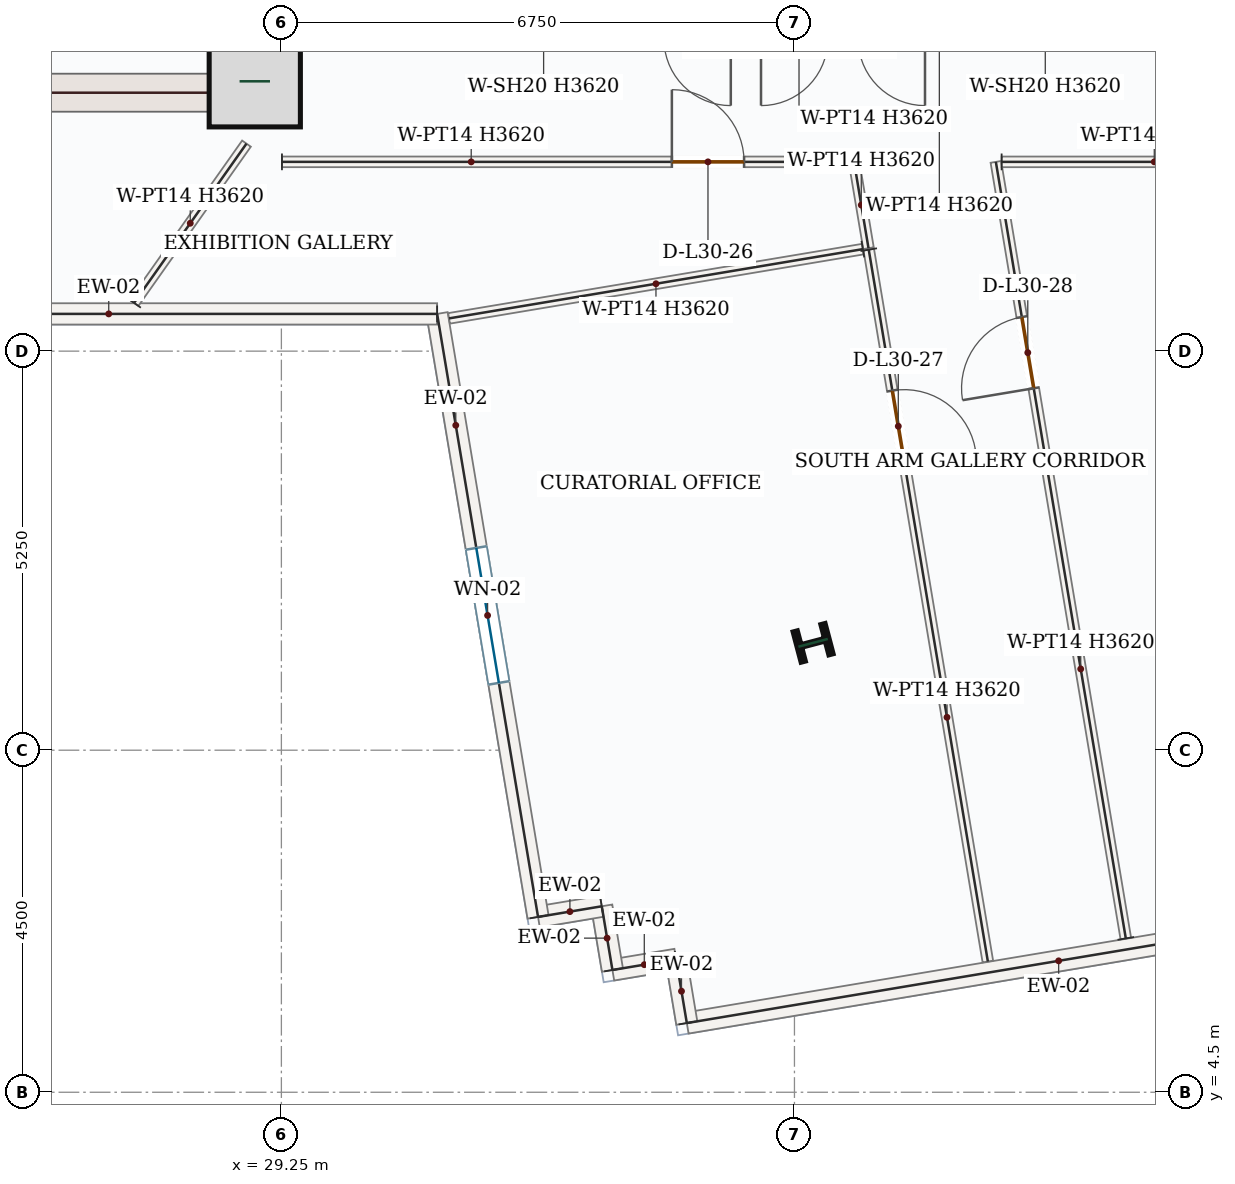
"""IFC4 building model, lengths in metres.
Left out: names, types, materials, properties, quantities, classifications, styles, units other than length and angle.
Written with IfcOpenShell. Run it as: python <this file> out.ifc"""

import sys

from ifc_helpers import new_model, si_unit, direction, frame, frame_2d, origin, origin_2d, place, context, subcontext, project, spatial, rectangle, i_section, extrude, source, transform, mapped, element, fill, save


model = new_model("IFC4")
c1 = context("Model", 3, precision=1e-05, world=origin(), true_north=direction((0.0, 1.0)))
c2 = subcontext(c1, "Body", "Model", "MODEL_VIEW")
j1 = project(units=[si_unit("LENGTHUNIT", "METRE"), si_unit("PLANEANGLEUNIT", "RADIAN")], contexts=[c1])
p1 = place(None, origin())
s1 = spatial("IfcSite", under=j1, at=p1, CompositionType="ELEMENT")
p2 = place(p1, origin())
s2 = spatial("IfcBuilding", under=s1, at=p2, CompositionType="ELEMENT")
p3 = place(p2, frame((0.0, 0.0, 135.6)))
s3 = spatial("IfcBuildingStorey", under=s2, at=p3, CompositionType="ELEMENT", Elevation=135.6)
p4 = place(p3, frame((29.0, 17.4, 0.0), z_axis=(0.0, 0.0, 1.0), x_axis=(0.0, 1.0, 0.0)))
e1 = element("IfcWall", 1, at=p4, inside=s3, PredefinedType="SHEAR", context=c2, shape_type="SweptSolid", body=[
    extrude(rectangle(XDim=8.55, YDim=0.5, at=frame_2d((4.275, 0.0))), origin(), (0.0, 0.0, 1.0), 3.62),
])
p5 = place(p4, frame((6.65, 0.0, 0.0)))
e2 = element("IfcOpeningElement", 2, at=p5, cuts=e1, PredefinedType="OPENING", context=c2, shape_type="SweptSolid", body=[
    extrude(rectangle(XDim=1.1, YDim=2.2, at=frame_2d((0.55, 1.1))), frame((0.0, 0.26, 0.0), z_axis=(0.0, -1.0, 0.0), x_axis=(1.0, 0.0, 0.0)), (0.0, 0.0, 1.0), 0.52),
])
p6 = place(p4, frame((2.7, 0.0, 0.0)))
e3 = element("IfcOpeningElement", 3, at=p6, cuts=e1, PredefinedType="OPENING", context=c2, shape_type="SweptSolid", body=[
    extrude(rectangle(XDim=0.88, YDim=2.1, at=frame_2d((0.44, 1.05))), frame((0.0, 0.26, 0.0), z_axis=(0.0, -1.0, 0.0), x_axis=(1.0, 0.0, 0.0)), (0.0, 0.0, 1.0), 0.52),
])
p7 = place(p4, frame((4.6, 0.0, 0.0)))
e4 = element("IfcOpeningElement", 4, at=p7, cuts=e1, PredefinedType="OPENING", context=c2, shape_type="SweptSolid", body=[
    extrude(rectangle(XDim=0.88, YDim=2.1, at=frame_2d((0.44, 1.05))), frame((0.0, 0.26, 0.0), z_axis=(0.0, -1.0, 0.0), x_axis=(1.0, 0.0, 0.0)), (0.0, 0.0, 1.0), 0.52),
])
m1 = source(origin(), c2, "Body", "SweptSolid", [
    extrude(rectangle(XDim=7.0, YDim=0.5, at=frame_2d((3.5, 0.0))), origin(), (0.0, 0.0, 1.0), 3.62),
])
p8 = place(p3, frame((21.75, 17.65, 0.0), z_axis=(0.0, 0.0, 1.0), x_axis=(1.0, 0.0, 0.0)))
e5 = element("IfcWall", 5, at=p8, inside=s3, PredefinedType="SHEAR", context=c2, shape_type="MappedRepresentation", body=[
    mapped(m1, transform((0.0, 0.0, 0.0), x_axis=(1.0, 0.0, 0.0), y_axis=(0.0, 1.0, 0.0), z_axis=(0.0, 0.0, 1.0), scale=1.0)),
])
m2 = source(origin(), c2, "Body", "SweptSolid", [
    extrude(rectangle(XDim=1.2, YDim=1.2, at=origin_2d()), origin(), (0.0, 0.0, 1.0), 3.9),
])
p9 = place(p3, frame((28.9, 17.8, 0.0), z_axis=(0.0, 0.0, 1.0), x_axis=(1.0, 0.0, 0.0)))
e6 = element("IfcColumn", 6, at=p9, inside=s3, PredefinedType="COLUMN", context=c2, shape_type="MappedRepresentation", body=[
    mapped(m2, transform((0.0, 0.0, 0.0), x_axis=(1.0, 0.0, 0.0), y_axis=(0.0, 1.0, 0.0), z_axis=(0.0, 0.0, 1.0), scale=1.0)),
])
m3 = source(origin(), c2, "Body", "SweptSolid", [
    extrude(i_section(OverallWidth=0.412, OverallDepth=0.435, WebThickness=0.036, FlangeThickness=0.057, FilletRadius=0.018, at=origin_2d()), origin(), (0.0, 0.0, 1.0), 3.9),
])
p10 = place(p3, frame((36.245, 10.412, 0.0), z_axis=(0.0, 0.0, 1.0), x_axis=(-0.255445757936, 0.966823388604, 0.0)))
e7 = element("IfcColumn", 7, at=p10, inside=s3, PredefinedType="COLUMN", context=c2, shape_type="MappedRepresentation", body=[
    mapped(m3, transform((0.0, 0.0, 0.0), x_axis=(1.0, 0.0, 0.0), y_axis=(0.0, 1.0, 0.0), z_axis=(0.0, 0.0, 1.0), scale=1.0)),
])
m4 = source(origin(), c2, "Body", "SweptSolid", [
    extrude(rectangle(XDim=9.92, YDim=0.28, at=frame_2d((4.96, 0.0))), origin(), (0.0, 0.0, 1.0), 3.62),
])
p11 = place(p3, frame((44.368, 7.048, 0.0), z_axis=(0.0, 0.0, 1.0), x_axis=(-0.986282616944, -0.165065440096, 0.0)))
e8 = element("IfcWall", 8, at=p11, inside=s3, PredefinedType="SOLIDWALL", context=c2, shape_type="MappedRepresentation", body=[
    mapped(m4, transform((0.0, 0.0, 0.0), x_axis=(1.0, 0.0, 0.0), y_axis=(0.0, 1.0, 0.0), z_axis=(0.0, 0.0, 1.0), scale=1.0)),
])
m5 = source(origin(), c2, "Body", "SweptSolid", [
    extrude(rectangle(XDim=0.85, YDim=0.28, at=frame_2d((0.425, 0.0))), origin(), (0.0, 0.0, 1.0), 3.62),
])
for number, where, z_axis, x_axis in (
    (9, (34.584, 5.41, 0.0), (0.0, 0.0, 1.0), (-0.165, 0.986, 0.0)),
    (10, (34.444, 6.249, 0.0), (0.0, 0.0, 1.0), (-0.986, -0.165, 0.0)),
):
    element("IfcWall", number, at=place(p3, frame(where, z_axis=z_axis, x_axis=x_axis)), inside=s3, PredefinedType="SOLIDWALL", context=c2, shape_type="MappedRepresentation", body=[
        mapped(m5, transform((0.0, 0.0, 0.0), x_axis=(1.0, 0.0, 0.0), y_axis=(0.0, 1.0, 0.0), z_axis=(0.0, 0.0, 1.0), scale=1.0)),
    ])
m6 = source(origin(), c2, "Body", "SweptSolid", [
    extrude(rectangle(XDim=0.85, YDim=0.28, at=frame_2d((0.425, 0.0))), origin(), (0.0, 0.0, 1.0), 3.62),
])
p12 = place(p3, frame((33.605, 6.108, 0.0), z_axis=(0.0, 0.0, 1.0), x_axis=(-0.164911450083, 0.986308376539, 0.0)))
e11 = element("IfcWall", 11, at=p12, inside=s3, PredefinedType="SOLIDWALL", context=c2, shape_type="MappedRepresentation", body=[
    mapped(m6, transform((0.0, 0.0, 0.0), x_axis=(1.0, 0.0, 0.0), y_axis=(0.0, 1.0, 0.0), z_axis=(0.0, 0.0, 1.0), scale=1.0)),
])
p13 = place(p3, frame((33.465, 6.947, 0.0), z_axis=(0.0, 0.0, 1.0), x_axis=(-0.986316186628, -0.164864732418, 0.0)))
e12 = element("IfcWall", 12, at=p13, inside=s3, PredefinedType="SOLIDWALL", context=c2, shape_type="MappedRepresentation", body=[
    mapped(m5, transform((0.0, 0.0, 0.0), x_axis=(1.0, 0.0, 0.0), y_axis=(0.0, 1.0, 0.0), z_axis=(0.0, 0.0, 1.0), scale=1.0)),
])
p14 = place(p3, frame((32.627, 6.806, 0.0), z_axis=(0.0, 0.0, 1.0), x_axis=(-0.165048626668, 0.986285430712, 0.0)))
e13 = element("IfcWall", 13, at=p14, inside=s3, PredefinedType="SOLIDWALL", context=c2, shape_type="SweptSolid", body=[
    extrude(rectangle(XDim=8.044, YDim=0.28, at=frame_2d((4.022, 0.0))), origin(), (0.0, 0.0, 1.0), 3.62),
])
p15 = place(p14, frame((3.122, 0.0, 0.85)))
e14 = element("IfcOpeningElement", 14, at=p15, cuts=e13, PredefinedType="OPENING", context=c2, shape_type="SweptSolid", body=[
    extrude(rectangle(XDim=1.8, YDim=1.75, at=frame_2d((0.9, 0.875))), frame((0.0, 0.15, 0.0), z_axis=(0.0, -1.0, 0.0), x_axis=(1.0, 0.0, 0.0)), (0.0, 0.0, 1.0), 0.3),
])
m7 = source(origin(), c2, "Body", "SweptSolid", [
    extrude(rectangle(XDim=8.641, YDim=0.28, at=frame_2d((4.321, 0.0))), origin(), (0.0, 0.0, 1.0), 3.62),
])
p16 = place(p3, frame((31.299, 14.74, 0.0), z_axis=(0.0, 0.0, 1.0), x_axis=(-1.0, 0.0, 0.0)))
e15 = element("IfcWall", 15, at=p16, inside=s3, PredefinedType="SOLIDWALL", context=c2, shape_type="MappedRepresentation", body=[
    mapped(m7, transform((0.0, 0.0, 0.0), x_axis=(1.0, 0.0, 0.0), y_axis=(0.0, 1.0, 0.0), z_axis=(0.0, 0.0, 1.0), scale=1.0)),
])
p17 = place(p3, frame((29.258, 16.74, 0.0), z_axis=(0.0, 0.0, 1.0), x_axis=(0.999999999474, -3.2436991e-05, 0.0)))
e16 = element("IfcWall", 16, at=p17, inside=s3, PredefinedType="PARTITIONING", context=c2, shape_type="SweptSolid", body=[
    extrude(rectangle(XDim=7.527, YDim=0.14, at=frame_2d((3.763, 0.0))), origin(), (0.0, 0.0, 1.0), 3.62),
])
p18 = place(p17, frame((5.13, 0.0, 0.0)))
e17 = element("IfcOpeningElement", 17, at=p18, cuts=e16, PredefinedType="OPENING", context=c2, shape_type="SweptSolid", body=[
    extrude(rectangle(XDim=0.95, YDim=2.15, at=frame_2d((0.475, 1.075))), frame((0.0, 0.08, 0.0), z_axis=(0.0, -1.0, 0.0), x_axis=(1.0, 0.0, 0.0)), (0.0, 0.0, 1.0), 0.16),
])
m8 = source(origin(), c2, "Body", "SweptSolid", [
    extrude(rectangle(XDim=1.151, YDim=0.14, at=frame_2d((0.576, 0.0))), origin(), (0.0, 0.0, 1.0), 3.62),
])
p19 = place(p3, frame((36.784, 16.74, 0.0), z_axis=(0.0, 0.0, 1.0), x_axis=(0.164983559387, -0.986296317104, 0.0)))
e18 = element("IfcWall", 18, at=p19, inside=s3, PredefinedType="PARTITIONING", context=c2, shape_type="MappedRepresentation", body=[
    mapped(m8, transform((0.0, 0.0, 0.0), x_axis=(1.0, 0.0, 0.0), y_axis=(0.0, 1.0, 0.0), z_axis=(0.0, 0.0, 1.0), scale=1.0)),
])
m9 = source(origin(), c2, "Body", "SweptSolid", [
    extrude(rectangle(XDim=5.52, YDim=0.14, at=frame_2d((2.76, 0.0))), origin(), (0.0, 0.0, 1.0), 3.62),
])
p20 = place(p3, frame((36.9, 15.592, 0.0), z_axis=(0.0, 0.0, 1.0), x_axis=(-0.986290930087, -0.165015760545, 0.0)))
e19 = element("IfcWall", 19, at=p20, inside=s3, PredefinedType="PARTITIONING", context=c2, shape_type="MappedRepresentation", body=[
    mapped(m9, transform((0.0, 0.0, 0.0), x_axis=(1.0, 0.0, 0.0), y_axis=(0.0, 1.0, 0.0), z_axis=(0.0, 0.0, 1.0), scale=1.0)),
])
m10 = source(origin(), c2, "Body", "SweptSolid", [
    extrude(rectangle(XDim=2.565, YDim=0.14, at=frame_2d((1.282, 0.0))), origin(), (0.0, 0.0, 1.0), 3.62),
])
p21 = place(p3, frame((27.311, 14.885, 0.0), z_axis=(0.0, 0.0, 1.0), x_axis=(0.576926084836, 0.816796359343, 0.0)))
e20 = element("IfcWall", 20, at=p21, inside=s3, PredefinedType="PARTITIONING", context=c2, shape_type="MappedRepresentation", body=[
    mapped(m10, transform((0.0, 0.0, 0.0), x_axis=(1.0, 0.0, 0.0), y_axis=(0.0, 1.0, 0.0), z_axis=(0.0, 0.0, 1.0), scale=1.0)),
])
p22 = place(p3, frame((36.978, 15.585, 0.0), z_axis=(0.0, 0.0, 1.0), x_axis=(0.165024399413, -0.986289484684, 0.0)))
e21 = element("IfcWall", 21, at=p22, inside=s3, PredefinedType="PARTITIONING", context=c2, shape_type="SweptSolid", body=[
    extrude(rectangle(XDim=9.495, YDim=0.14, at=frame_2d((4.748, 0.0))), origin(), (0.0, 0.0, 1.0), 3.62),
])
p23 = place(p22, frame((1.88, 0.0, 0.0)))
e22 = element("IfcOpeningElement", 22, at=p23, cuts=e21, PredefinedType="OPENING", context=c2, shape_type="SweptSolid", body=[
    extrude(rectangle(XDim=0.95, YDim=2.15, at=frame_2d((0.475, 1.075))), frame((0.0, 0.08, 0.0), z_axis=(0.0, -1.0, 0.0), x_axis=(1.0, 0.0, 0.0)), (0.0, 0.0, 1.0), 0.16),
])
p24 = place(p3, frame((40.359, 6.524, 0.0), z_axis=(0.0, 0.0, 1.0), x_axis=(-0.165056345303, 0.986284139016, 0.0)))
e23 = element("IfcWall", 23, at=p24, inside=s3, PredefinedType="PARTITIONING", context=c2, shape_type="SweptSolid", body=[
    extrude(rectangle(XDim=10.358, YDim=0.14, at=frame_2d((5.179, 0.0))), origin(), (0.0, 0.0, 1.0), 3.62),
])
p25 = place(p24, frame((7.338, 0.0, 0.0)))
e24 = element("IfcOpeningElement", 24, at=p25, cuts=e23, PredefinedType="OPENING", context=c2, shape_type="SweptSolid", body=[
    extrude(rectangle(XDim=0.95, YDim=2.15, at=frame_2d((0.475, 1.075))), frame((0.0, 0.08, 0.0), z_axis=(0.0, -1.0, 0.0), x_axis=(1.0, 0.0, 0.0)), (0.0, 0.0, 1.0), 0.16),
])
m11 = source(origin(), c2, "Body", "SweptSolid", [
    extrude(rectangle(XDim=4.017, YDim=0.14, at=frame_2d((2.008, 0.0))), origin(), (0.0, 0.0, 1.0), 3.079),
])
p26 = place(p3, frame((38.726, 16.74, 0.0), z_axis=(0.0, 0.0, 1.0), x_axis=(0.999999998153, 6.0779189e-05, 0.0)))
e25 = element("IfcWall", 25, at=p26, inside=s3, PredefinedType="PARTITIONING", context=c2, shape_type="MappedRepresentation", body=[
    mapped(m11, transform((0.0, 0.0, 0.0), x_axis=(1.0, 0.0, 0.0), y_axis=(0.0, 1.0, 0.0), z_axis=(0.0, 0.0, 1.0), scale=1.0)),
])
m12 = source(origin(), c2, "Body", "SweptSolid", [
    extrude(rectangle(XDim=1.8, YDim=1.75, at=frame_2d((0.9, 0.875))), frame((0.0, 0.03, 0.0), z_axis=(0.0, -1.0, 0.0), x_axis=(1.0, 0.0, 0.0)), (0.0, 0.0, 1.0), 0.06),
])
p27 = place(p15, origin())
e26 = element("IfcWindow", 26, at=p27, inside=s3, PartitioningType="DOUBLE_PANEL_VERTICAL", PredefinedType="WINDOW", context=c2, shape_type="MappedRepresentation", body=[
    mapped(m12, transform((0.0, 0.0, 0.0), x_axis=(1.0, 0.0, 0.0), y_axis=(0.0, 1.0, 0.0), z_axis=(0.0, 0.0, 1.0), scale=1.0)),
])
fill(e14, e26)
m13 = source(origin(), c2, "Body", "SweptSolid", [
    extrude(rectangle(XDim=0.95, YDim=2.15, at=frame_2d((0.475, 1.075))), frame((0.0, 0.025, 0.0), z_axis=(0.0, -1.0, 0.0), x_axis=(1.0, 0.0, 0.0)), (0.0, 0.0, 1.0), 0.05),
])
p28 = place(p18, origin())
e27 = element("IfcDoor", 27, at=p28, inside=s3, OperationType="SINGLE_SWING_LEFT", PredefinedType="DOOR", context=c2, shape_type="MappedRepresentation", body=[
    mapped(m13, transform((0.0, 0.0, 0.0), x_axis=(1.0, 0.0, 0.0), y_axis=(0.0, 1.0, 0.0), z_axis=(0.0, 0.0, 1.0), scale=1.0)),
])
fill(e17, e27)
p29 = place(p23, origin())
e28 = element("IfcDoor", 28, at=p29, inside=s3, OperationType="SINGLE_SWING_RIGHT", PredefinedType="DOOR", context=c2, shape_type="MappedRepresentation", body=[
    mapped(m13, transform((0.0, 0.0, 0.0), x_axis=(1.0, 0.0, 0.0), y_axis=(0.0, 1.0, 0.0), z_axis=(0.0, 0.0, 1.0), scale=1.0)),
])
fill(e22, e28)
p30 = place(p25, origin())
e29 = element("IfcDoor", 29, at=p30, inside=s3, OperationType="SINGLE_SWING_LEFT", PredefinedType="DOOR", context=c2, shape_type="MappedRepresentation", body=[
    mapped(m13, transform((0.0, 0.0, 0.0), x_axis=(1.0, 0.0, 0.0), y_axis=(0.0, 1.0, 0.0), z_axis=(0.0, 0.0, 1.0), scale=1.0)),
])
fill(e24, e29)
save(model, sys.argv[1])
